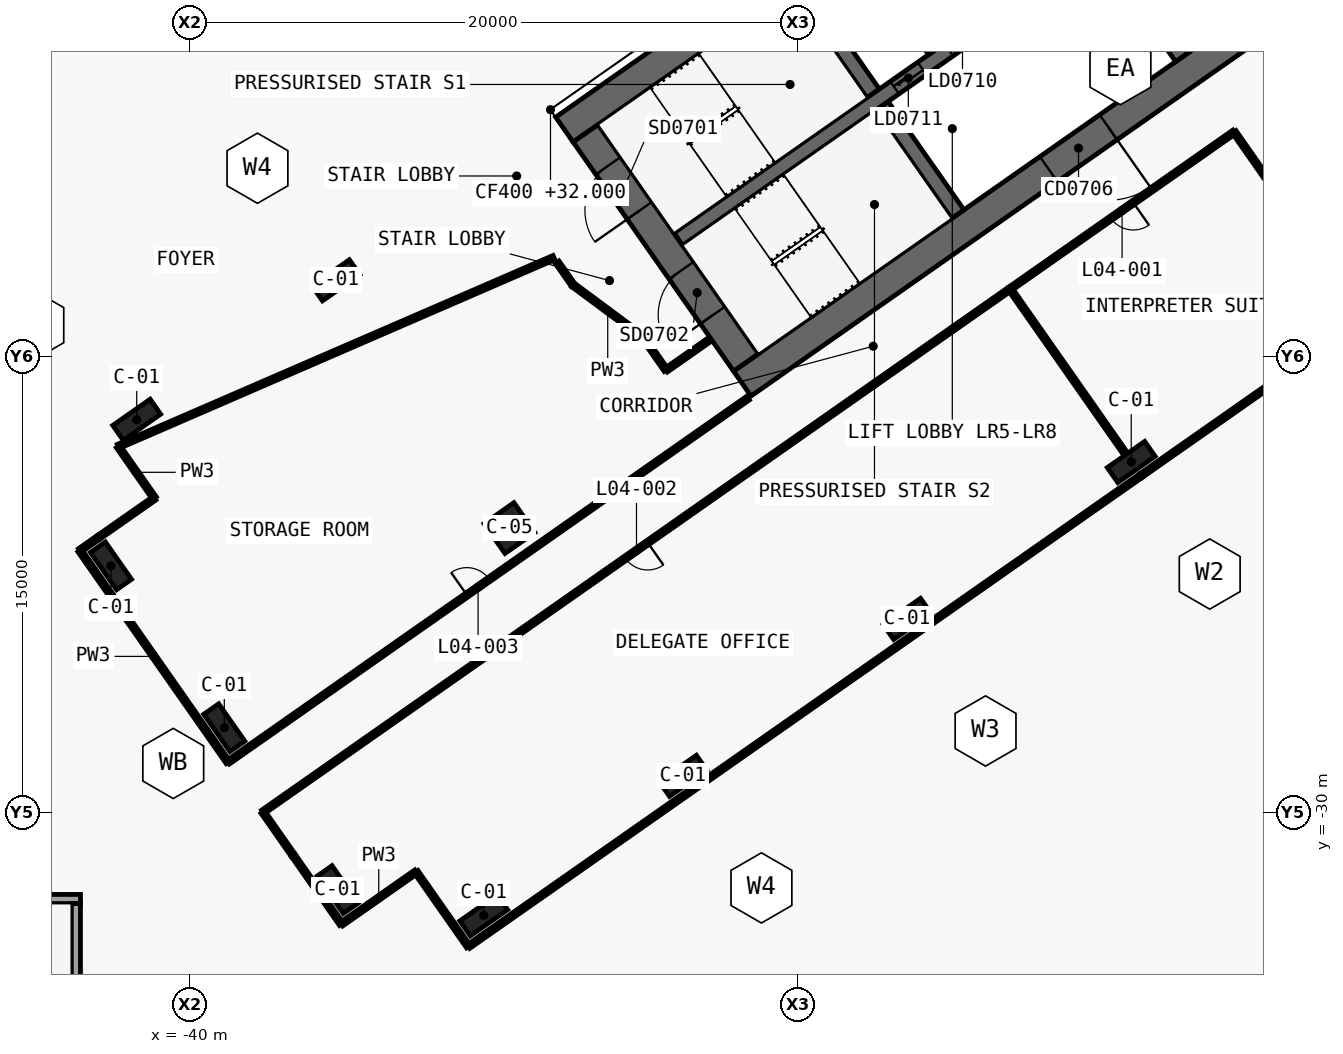
"""IFC4 building model, lengths in metres.
Left out: names, types, materials, properties, quantities, classifications, styles, units other than length and angle.
Written with IfcOpenShell. Run it as: python <this file> out.ifc"""

import sys

from ifc_helpers import new_model, si_unit, direction, frame, frame_2d, origin, origin_2d, place, context, subcontext, project, spatial, polyline, rectangle, outline, extrude, element, fill, save


model = new_model("IFC4")
c1 = context("Model", 3, precision=1e-05, world=origin(), true_north=direction((0.0, 1.0)))
c2 = subcontext(c1, "Body", "Model", "MODEL_VIEW")
j1 = project(units=[si_unit("LENGTHUNIT", "METRE"), si_unit("PLANEANGLEUNIT", "RADIAN")], contexts=[c1])
p1 = place(None, origin())
s1 = spatial("IfcSite", under=j1, at=p1, CompositionType="ELEMENT")
p2 = place(p1, origin())
s2 = spatial("IfcBuilding", under=s1, at=p2, CompositionType="ELEMENT")
p3 = place(p2, frame((0.0, 0.0, 32.0)))
s3 = spatial("IfcBuildingStorey", under=s2, at=p3, CompositionType="ELEMENT", Elevation=32.0)
p4 = place(p3, frame((0.037, 11.867, 0.0), z_axis=(0.0, 0.0, 1.0), x_axis=(-0.819155306259, -0.573571777746, 0.0)))
e1 = element("IfcWall", 1, at=p4, inside=s3, PredefinedType="SHEAR", context=c2, shape_type="SweptSolid", body=[
    extrude(outline(polyline([(33.837, 0.5), (0.7, 0.5), (0.0, -0.5), (33.837, -0.5), (33.837, 0.5)])), origin(), (0.0, 0.0, 1.0), 5.5),
])
p5 = place(p3, frame((0.037, -0.585, 0.0), z_axis=(0.0, 0.0, 1.0), x_axis=(-0.819157152511, -0.573569140985, 0.0)))
e2 = element("IfcWall", 2, at=p5, inside=s3, PredefinedType="SHEAR", context=c2, shape_type="SweptSolid", body=[
    extrude(outline(polyline([(26.695, 0.5), (0.7, 0.5), (0.0, -0.5), (26.695, -0.5), (26.695, 0.5)])), origin(), (0.0, 0.0, 1.0), 5.5),
])
p6 = place(p5, frame((2.995, 0.0, 0.0)))
e3 = element("IfcOpeningElement", 3, at=p6, cuts=e2, PredefinedType="OPENING", context=c2, shape_type="SweptSolid", body=[
    extrude(rectangle(XDim=2.4, YDim=2.1, at=frame_2d((1.2, 1.05))), frame((0.0, 0.51, 0.0), z_axis=(0.0, -1.0, 0.0), x_axis=(1.0, 0.0, 0.0)), (0.0, 0.0, 1.0), 1.02),
])
p7 = place(p5, frame((11.995, 0.0, 0.0)))
e4 = element("IfcOpeningElement", 4, at=p7, cuts=e2, PredefinedType="OPENING", context=c2, shape_type="SweptSolid", body=[
    extrude(rectangle(XDim=2.4, YDim=2.1, at=frame_2d((1.2, 1.05))), frame((0.0, 0.51, 0.0), z_axis=(0.0, -1.0, 0.0), x_axis=(1.0, 0.0, 0.0)), (0.0, 0.0, 1.0), 1.02),
])
p8 = place(p3, frame((-21.708, -15.2, 0.0), z_axis=(0.0, 0.0, 1.0), x_axis=(-0.573576324356, 0.819152122709, 0.0)))
e5 = element("IfcWall", 5, at=p8, inside=s3, PredefinedType="SHEAR", context=c2, shape_type="SweptSolid", body=[
    extrude(outline(polyline([(0.0, 0.5), (0.0, -0.5), (9.2, -0.5), (9.2, 0.5), (0.0, 0.5)])), origin(), (0.0, 0.0, 1.0), 5.5),
])
p9 = place(p8, frame((6.1, 0.0, 0.0)))
e6 = element("IfcOpeningElement", 6, at=p9, cuts=e5, PredefinedType="OPENING", context=c2, shape_type="SweptSolid", body=[
    extrude(rectangle(XDim=1.8, YDim=2.1, at=frame_2d((0.9, 1.05))), frame((0.0, 0.51, 0.0), z_axis=(0.0, -1.0, 0.0), x_axis=(1.0, 0.0, 0.0)), (0.0, 0.0, 1.0), 1.02),
])
p10 = place(p8, frame((1.9, 0.0, 0.0)))
e7 = element("IfcOpeningElement", 7, at=p10, cuts=e5, PredefinedType="OPENING", context=c2, shape_type="SweptSolid", body=[
    extrude(rectangle(XDim=1.8, YDim=2.1, at=frame_2d((0.9, 1.05))), frame((0.0, 0.51, 0.0), z_axis=(0.0, -1.0, 0.0), x_axis=(1.0, 0.0, 0.0)), (0.0, 0.0, 1.0), 1.02),
])
p11 = place(p3, frame((-7.372, -5.162, 0.0), z_axis=(0.0, 0.0, 1.0), x_axis=(-0.573594173421, 0.819139624372, 0.0)))
e8 = element("IfcWall", 8, at=p11, inside=s3, PredefinedType="SHEAR", context=c2, shape_type="SweptSolid", body=[
    extrude(outline(polyline([(4.35, 0.25), (0.0, 0.25), (0.0, -0.25), (4.35, -0.25), (4.35, 0.25)])), origin(), (0.0, 0.0, 1.0), 5.5),
])
p12 = place(p3, frame((-14.745, -10.324, 0.0), z_axis=(0.0, 0.0, 1.0), x_axis=(-0.57356780395, 0.819158088694, 0.0)))
e9 = element("IfcWall", 9, at=p12, inside=s3, PredefinedType="SHEAR", context=c2, shape_type="SweptSolid", body=[
    extrude(outline(polyline([(4.35, 0.25), (0.0, 0.25), (0.0, -0.25), (4.35, -0.25), (4.35, 0.25)])), origin(), (0.0, 0.0, 1.0), 5.5),
])
p13 = place(p3, frame((-17.527, -6.352, 0.0), z_axis=(0.0, 0.0, 1.0), x_axis=(-0.573530143085, 0.819184457233, 0.0)))
e10 = element("IfcWall", 10, at=p13, inside=s3, PredefinedType="SHEAR", context=c2, shape_type="SweptSolid", body=[
    extrude(outline(polyline([(4.35, -0.25), (4.35, 0.25), (0.0, 0.25), (0.0, -0.25), (4.35, -0.25)])), origin(), (0.0, 0.0, 1.0), 5.5),
])
p14 = place(p3, frame((-2.638, 3.768, 0.0), z_axis=(0.0, 0.0, 1.0), x_axis=(-0.819148977158, -0.573580816643, 0.0)))
e11 = element("IfcWall", 11, at=p14, inside=s3, PredefinedType="SHEAR", context=c2, shape_type="SweptSolid", body=[
    extrude(outline(polyline([(26.0, 0.25), (0.0, 0.25), (0.0, -0.25), (26.0, -0.25), (26.0, 0.25)])), origin(), (0.0, 0.0, 1.0), 5.5),
])
p15 = place(p14, frame((1.169, 0.0, 0.0)))
e12 = element("IfcOpeningElement", 12, at=p15, cuts=e11, PredefinedType="OPENING", context=c2, shape_type="SweptSolid", body=[
    extrude(rectangle(XDim=1.1, YDim=2.1, at=frame_2d((0.55, 1.05))), frame((0.0, 0.26, 0.0), z_axis=(0.0, -1.0, 0.0), x_axis=(1.0, 0.0, 0.0)), (0.0, 0.0, 1.0), 0.52),
])
p16 = place(p14, frame((3.206, 0.0, 0.0)))
e13 = element("IfcOpeningElement", 13, at=p16, cuts=e11, PredefinedType="OPENING", context=c2, shape_type="SweptSolid", body=[
    extrude(rectangle(XDim=1.1, YDim=2.1, at=frame_2d((0.55, 1.05))), frame((0.0, 0.26, 0.0), z_axis=(0.0, -1.0, 0.0), x_axis=(1.0, 0.0, 0.0)), (0.0, 0.0, 1.0), 0.52),
])
p17 = place(p14, frame((5.244, 0.0, 0.0)))
e14 = element("IfcOpeningElement", 14, at=p17, cuts=e11, PredefinedType="OPENING", context=c2, shape_type="SweptSolid", body=[
    extrude(rectangle(XDim=1.1, YDim=2.1, at=frame_2d((0.55, 1.05))), frame((0.0, 0.26, 0.0), z_axis=(0.0, -1.0, 0.0), x_axis=(1.0, 0.0, 0.0)), (0.0, 0.0, 1.0), 0.52),
])
p18 = place(p14, frame((7.281, 0.0, 0.0)))
e15 = element("IfcOpeningElement", 15, at=p18, cuts=e11, PredefinedType="OPENING", context=c2, shape_type="SweptSolid", body=[
    extrude(rectangle(XDim=1.1, YDim=2.1, at=frame_2d((0.55, 1.05))), frame((0.0, 0.26, 0.0), z_axis=(0.0, -1.0, 0.0), x_axis=(1.0, 0.0, 0.0)), (0.0, 0.0, 1.0), 0.52),
])
p19 = place(p14, frame((9.688, 0.0, 0.0)))
e16 = element("IfcOpeningElement", 16, at=p19, cuts=e11, PredefinedType="OPENING", context=c2, shape_type="SweptSolid", body=[
    extrude(rectangle(XDim=1.1, YDim=2.1, at=frame_2d((0.55, 1.05))), frame((0.0, 0.26, 0.0), z_axis=(0.0, -1.0, 0.0), x_axis=(1.0, 0.0, 0.0)), (0.0, 0.0, 1.0), 0.52),
])
p20 = place(p14, frame((11.863, 0.0, 0.0)))
e17 = element("IfcOpeningElement", 17, at=p20, cuts=e11, PredefinedType="OPENING", context=c2, shape_type="SweptSolid", body=[
    extrude(rectangle(XDim=1.1, YDim=2.1, at=frame_2d((0.55, 1.05))), frame((0.0, 0.26, 0.0), z_axis=(0.0, -1.0, 0.0), x_axis=(1.0, 0.0, 0.0)), (0.0, 0.0, 1.0), 0.52),
])
p21 = place(p14, frame((14.038, 0.0, 0.0)))
e18 = element("IfcOpeningElement", 18, at=p21, cuts=e11, PredefinedType="OPENING", context=c2, shape_type="SweptSolid", body=[
    extrude(rectangle(XDim=1.1, YDim=2.1, at=frame_2d((0.55, 1.05))), frame((0.0, 0.26, 0.0), z_axis=(0.0, -1.0, 0.0), x_axis=(1.0, 0.0, 0.0)), (0.0, 0.0, 1.0), 0.52),
])
p22 = place(p14, frame((16.212, 0.0, 0.0)))
e19 = element("IfcOpeningElement", 19, at=p22, cuts=e11, PredefinedType="OPENING", context=c2, shape_type="SweptSolid", body=[
    extrude(rectangle(XDim=1.1, YDim=2.1, at=frame_2d((0.55, 1.05))), frame((0.0, 0.26, 0.0), z_axis=(0.0, -1.0, 0.0), x_axis=(1.0, 0.0, 0.0)), (0.0, 0.0, 1.0), 0.52),
])
p23 = place(p3, frame((-49.4, -32.85, 0.0), z_axis=(0.0, 0.0, 1.0), x_axis=(1.0, 0.0, 0.0)))
e20 = element("IfcWall", 20, at=p23, inside=s3, PredefinedType="SOLIDWALL", context=c2, shape_type="SweptSolid", body=[
    extrude(rectangle(XDim=5.8, YDim=0.3, at=frame_2d((2.9, 0.0))), origin(), (0.0, 0.0, 1.0), 5.5),
])
p24 = place(p3, frame((-43.75, -43.0, 0.0), z_axis=(0.0, 0.0, 1.0), x_axis=(0.0, 1.0, 0.0)))
e21 = element("IfcWall", 21, at=p24, inside=s3, PredefinedType="SOLIDWALL", context=c2, shape_type="SweptSolid", body=[
    extrude(rectangle(XDim=10.0, YDim=0.3, at=frame_2d((5.0, 0.0))), origin(), (0.0, 0.0, 1.0), 5.5),
])
p25 = place(p24, frame((0.212, 0.0, 0.0)))
e22 = element("IfcOpeningElement", 22, at=p25, cuts=e21, PredefinedType="OPENING", context=c2, shape_type="SweptSolid", body=[
    extrude(rectangle(XDim=2.1, YDim=2.1, at=frame_2d((1.05, 1.05))), frame((0.0, 0.16, 0.0), z_axis=(0.0, -1.0, 0.0), x_axis=(1.0, 0.0, 0.0)), (0.0, 0.0, 1.0), 0.32),
])
for number, where, z_axis, x_axis in (
    (23, (-9.038, -18.475, 0.0), (0.0, 0.0, 1.0), (-0.819, -0.574, 0.0)),
    (24, (-16.41, -23.637, 0.0), (0.0, 0.0, 1.0), (-0.819, -0.574, 0.0)),
    (25, (-23.782, -28.799, 0.0), (0.0, 0.0, 1.0), (-0.819, -0.574, 0.0)),
    (26, (-30.336, -33.388, 0.0), (0.0, 0.0, 1.0), (-0.819, -0.574, 0.0)),
    (27, (-35.197, -12.498, 0.0), (0.0, 0.0, 1.0), (-0.819, -0.574, 0.0)),
    (28, (-41.75, -17.087, 0.0), (0.0, 0.0, 1.0), (-0.819, -0.574, 0.0)),
    (29, (-35.14, -32.541, 0.0), (0.0, 0.0, 1.0), (-0.574, 0.819, 0.0)),
    (30, (-38.869, -27.216, 0.0), (0.0, 0.0, 1.0), (-0.574, 0.819, 0.0)),
    (31, (-42.597, -21.892, 0.0), (0.0, 0.0, 1.0), (-0.574, 0.819, 0.0)),
):
    element("IfcColumn", number, at=place(p3, frame(where, z_axis=z_axis, x_axis=x_axis)), inside=s3, PredefinedType="COLUMN", context=c2, shape_type="SweptSolid", body=[
        extrude(rectangle(XDim=1.5, YDim=0.6, at=origin_2d()), origin(), (0.0, 0.0, 1.0), 5.5),
    ])
p26 = place(p3, frame((-29.49, -20.649, 0.0), z_axis=(0.0, 0.0, 1.0), x_axis=(-0.819152044289, -0.573576436351, 0.0)))
e32 = element("IfcColumn", 32, at=p26, inside=s3, PredefinedType="COLUMN", context=c2, shape_type="SweptSolid", body=[
    extrude(rectangle(XDim=1.2, YDim=1.2, at=origin_2d()), origin(), (0.0, 0.0, 1.0), 5.5),
])
p27 = place(p3, frame((-15.622, -5.018, 0.0), z_axis=(0.0, 0.0, 1.0), x_axis=(-0.573594173421, 0.819139624372, 0.0)))
e33 = element("IfcWall", 33, at=p27, inside=s3, PredefinedType="SOLIDWALL", context=c2, shape_type="SweptSolid", body=[
    extrude(rectangle(XDim=4.35, YDim=0.2, at=frame_2d((2.175, 0.0))), origin(), (0.0, 0.0, 1.0), 5.5),
])
p28 = place(p3, frame((-38.746, -28.351, 0.0), z_axis=(0.0, 0.0, 1.0), x_axis=(0.819148965066, 0.573580833911, 0.0)))
e34 = element("IfcWall", 34, at=p28, inside=s3, PredefinedType="PARTITIONING", context=c2, shape_type="SweptSolid", body=[
    extrude(rectangle(XDim=20.88, YDim=0.15, at=frame_2d((10.44, 0.0))), origin(), (0.0, 0.0, 1.0), 3.68),
])
p29 = place(p28, frame((9.59, 0.0, 0.0)))
e35 = element("IfcOpeningElement", 35, at=p29, cuts=e34, PredefinedType="OPENING", context=c2, shape_type="SweptSolid", body=[
    extrude(rectangle(XDim=0.9, YDim=2.1, at=frame_2d((0.45, 1.05))), frame((0.0, 0.085, 0.0), z_axis=(0.0, -1.0, 0.0), x_axis=(1.0, 0.0, 0.0)), (0.0, 0.0, 1.0), 0.17),
])
p30 = place(p3, frame((-5.652, -7.62, 0.0), z_axis=(0.0, 0.0, 1.0), x_axis=(-0.81915291695, -0.57357519006, 0.0)))
e36 = element("IfcWall", 36, at=p30, inside=s3, PredefinedType="PARTITIONING", context=c2, shape_type="SweptSolid", body=[
    extrude(rectangle(XDim=9.002, YDim=0.15, at=frame_2d((4.501, 0.0))), origin(), (0.0, 0.0, 1.0), 3.68),
])
p31 = place(p30, frame((4.051, 0.0, 0.0)))
e37 = element("IfcOpeningElement", 37, at=p31, cuts=e36, PredefinedType="OPENING", context=c2, shape_type="SweptSolid", body=[
    extrude(rectangle(XDim=0.9, YDim=2.1, at=frame_2d((0.45, 1.05))), frame((0.0, 0.085, 0.0), z_axis=(0.0, -1.0, 0.0), x_axis=(1.0, 0.0, 0.0)), (0.0, 0.0, 1.0), 0.17),
])
p32 = place(p3, frame((-13.022, -12.781, 0.0), z_axis=(0.0, 0.0, 1.0), x_axis=(-0.819154688631, -0.57357265982, 0.0)))
e38 = element("IfcWall", 38, at=p32, inside=s3, PredefinedType="PARTITIONING", context=c2, shape_type="SweptSolid", body=[
    extrude(rectangle(XDim=30.002, YDim=0.15, at=frame_2d((15.001, 0.0))), origin(), (0.0, 0.0, 1.0), 3.68),
])
p33 = place(p32, frame((14.551, 0.0, 0.0)))
e39 = element("IfcOpeningElement", 39, at=p33, cuts=e38, PredefinedType="OPENING", context=c2, shape_type="SweptSolid", body=[
    extrude(rectangle(XDim=0.9, YDim=2.1, at=frame_2d((0.45, 1.05))), frame((0.0, 0.085, 0.0), z_axis=(0.0, -1.0, 0.0), x_axis=(1.0, 0.0, 0.0)), (0.0, 0.0, 1.0), 0.17),
])
p34 = place(p3, frame((-8.723, -18.927, 0.0), z_axis=(0.0, 0.0, 1.0), x_axis=(0.81913387212, 0.573602388024, 0.0)))
e40 = element("IfcWall", 40, at=p34, inside=s3, PredefinedType="PARTITIONING", context=c2, shape_type="SweptSolid", body=[
    extrude(rectangle(XDim=6.552, YDim=0.15, at=frame_2d((3.276, 0.0))), origin(), (0.0, 0.0, 1.0), 5.1),
])
p35 = place(p3, frame((-35.017, -33.676, 0.0), z_axis=(0.0, 0.0, 1.0), x_axis=(0.81917072002, 0.573549763719, 0.0)))
e41 = element("IfcWall", 41, at=p35, inside=s3, PredefinedType="PARTITIONING", context=c2, shape_type="SweptSolid", body=[
    extrude(rectangle(XDim=2.999, YDim=0.15, at=frame_2d((1.5, 0.0))), origin(), (0.0, 0.0, 1.0), 3.88),
])
p36 = place(p3, frame((-32.56, -31.956, 0.0), z_axis=(0.0, 0.0, 1.0), x_axis=(0.573604390867, -0.819132469615, 0.0)))
e42 = element("IfcWall", 42, at=p36, inside=s3, PredefinedType="PARTITIONING", context=c2, shape_type="SweptSolid", body=[
    extrude(rectangle(XDim=2.999, YDim=0.15, at=frame_2d((1.5, 0.0))), origin(), (0.0, 0.0, 1.0), 3.88),
])
p37 = place(p3, frame((-30.839, -34.413, 0.0), z_axis=(0.0, 0.0, 1.0), x_axis=(0.819150779762, 0.573578242279, 0.0)))
e43 = element("IfcWall", 43, at=p37, inside=s3, PredefinedType="PARTITIONING", context=c2, shape_type="SweptSolid", body=[
    extrude(rectangle(XDim=27.002, YDim=0.15, at=frame_2d((13.501, 0.0))), origin(), (0.0, 0.0, 1.0), 4.08),
])
p38 = place(p3, frame((-36.599, -31.418, 0.0), z_axis=(0.0, 0.0, 1.0), x_axis=(0.57362881286, -0.819115367367, 0.0)))
e44 = element("IfcWall", 44, at=p38, inside=s3, PredefinedType="PARTITIONING", context=c2, shape_type="SweptSolid", body=[
    extrude(rectangle(XDim=2.756, YDim=0.15, at=frame_2d((1.378, 0.0))), origin(), (0.0, 0.0, 1.0), 5.1),
])
p39 = place(p3, frame((-42.359, -17.961, 0.0), z_axis=(0.0, 0.0, 1.0), x_axis=(0.573603984281, -0.819132754331, 0.0)))
e45 = element("IfcWall", 45, at=p39, inside=s3, PredefinedType="PARTITIONING", context=c2, shape_type="SweptSolid", body=[
    extrude(rectangle(XDim=2.082, YDim=0.15, at=frame_2d((1.041, 0.0))), origin(), (0.0, 0.0, 1.0), 3.88),
])
p40 = place(p3, frame((-41.165, -19.667, 0.0), z_axis=(0.0, 0.0, 1.0), x_axis=(-0.819149945048, -0.573579434366, 0.0)))
e46 = element("IfcWall", 46, at=p40, inside=s3, PredefinedType="PARTITIONING", context=c2, shape_type="SweptSolid", body=[
    extrude(rectangle(XDim=2.239, YDim=0.15, at=frame_2d((1.119, 0.0))), origin(), (0.0, 0.0, 1.0), 3.88),
])
p41 = place(p3, frame((-43.622, -21.387, 0.0), z_axis=(0.0, 0.0, 1.0), x_axis=(0.573487395822, -0.819214383928, 0.0)))
e47 = element("IfcWall", 47, at=p41, inside=s3, PredefinedType="PARTITIONING", context=c2, shape_type="SweptSolid", body=[
    extrude(rectangle(XDim=8.503, YDim=0.15, at=frame_2d((4.251, 0.0))), origin(), (0.0, 0.0, 1.0), 5.1),
])
p42 = place(p3, frame((-43.0, -20.952, 0.0), z_axis=(0.0, 0.0, 1.0), x_axis=(-0.819216809636, -0.573483930734, 0.0)))
e48 = element("IfcWall", 48, at=p42, inside=s3, PredefinedType="PARTITIONING", context=c2, shape_type="SweptSolid", body=[
    extrude(rectangle(XDim=0.759, YDim=0.15, at=frame_2d((0.379, 0.0))), origin(), (0.0, 0.0, 1.0), 5.1),
])
p43 = place(p3, frame((-37.6, -29.988, 0.0), z_axis=(0.0, 0.0, 1.0), x_axis=(0.573518712821, -0.819192459709, 0.0)))
e49 = element("IfcWall", 49, at=p43, inside=s3, PredefinedType="PARTITIONING", context=c2, shape_type="SweptSolid", body=[
    extrude(rectangle(XDim=1.744, YDim=0.15, at=frame_2d((0.872, 0.0))), origin(), (0.0, 0.0, 1.0), 5.1),
])
p44 = place(p3, frame((-1.849, -13.051, 0.0), z_axis=(0.0, 0.0, 1.0), x_axis=(-0.573575988258, 0.819152358047, 0.0)))
e50 = element("IfcWall", 50, at=p44, inside=s3, PredefinedType="PARTITIONING", context=c2, shape_type="SweptSolid", body=[
    extrude(rectangle(XDim=6.632, YDim=0.15, at=frame_2d((3.316, 0.0))), origin(), (0.0, 0.0, 1.0), 3.68),
])
p45 = place(p3, frame((-28.026, -11.751, 0.0), z_axis=(0.0, 0.0, 1.0), x_axis=(-0.91753357696, -0.397658314577, 0.0)))
e51 = element("IfcWall", 51, at=p45, inside=s3, PredefinedType="PARTITIONING", context=c2, shape_type="SweptSolid", body=[
    extrude(rectangle(XDim=15.621, YDim=0.15, at=frame_2d((7.811, 0.0))), origin(), (0.0, 0.0, 1.0), 3.68),
])
p46 = place(p3, frame((-22.961, -14.49, 0.0), z_axis=(0.0, 0.0, 1.0), x_axis=(-0.819109000826, -0.573637903879, 0.0)))
e52 = element("IfcWall", 52, at=p46, inside=s3, PredefinedType="PARTITIONING", context=c2, shape_type="SweptSolid", body=[
    extrude(rectangle(XDim=1.68, YDim=0.15, at=frame_2d((0.84, 0.0))), origin(), (0.0, 0.0, 1.0), 5.1),
])
p47 = place(p3, frame((-24.337, -15.454, 0.0), z_axis=(0.0, 0.0, 1.0), x_axis=(-0.573571252353, 0.819155674139, 0.0)))
e53 = element("IfcWall", 53, at=p47, inside=s3, PredefinedType="PARTITIONING", context=c2, shape_type="SweptSolid", body=[
    extrude(rectangle(XDim=1.354, YDim=0.15, at=frame_2d((0.677, 0.0))), origin(), (0.0, 0.0, 1.0), 5.1),
])
p48 = place(p3, frame((-25.114, -14.345, 0.0), z_axis=(0.0, 0.0, 1.0), x_axis=(-0.803169525988, 0.59575054555, 0.0)))
e54 = element("IfcWall", 54, at=p48, inside=s3, PredefinedType="PARTITIONING", context=c2, shape_type="SweptSolid", body=[
    extrude(rectangle(XDim=2.846, YDim=0.15, at=frame_2d((1.423, 0.0))), origin(), (0.0, 0.0, 1.0), 5.1),
])
p49 = place(p3, frame((-27.4, -12.649, 0.0), z_axis=(0.0, 0.0, 1.0), x_axis=(-0.573713979357, 0.819055718428, 0.0)))
e55 = element("IfcWall", 55, at=p49, inside=s3, PredefinedType="PARTITIONING", context=c2, shape_type="SweptSolid", body=[
    extrude(rectangle(XDim=0.912, YDim=0.15, at=frame_2d((0.456, 0.0))), origin(), (0.0, 0.0, 1.0), 5.1),
])
p50 = place(p3, frame((-9.221, -18.213, 0.0), z_axis=(0.0, 0.0, 1.0), x_axis=(-0.573556251799, 0.819166177294, 0.0)))
e56 = element("IfcWall", 56, at=p50, inside=s3, PredefinedType="PARTITIONING", context=c2, shape_type="SweptSolid", body=[
    extrude(rectangle(XDim=6.63, YDim=0.15, at=frame_2d((3.315, 0.0))), origin(), (0.0, 0.0, 1.0), 3.68),
])
p51 = place(p22, origin())
e57 = element("IfcDoor", 57, at=p51, inside=s3, OperationType="SLIDING_TO_RIGHT", PredefinedType="DOOR", context=c2, shape_type="SweptSolid", body=[
    extrude(rectangle(XDim=1.1, YDim=2.1, at=frame_2d((0.55, 1.05))), frame((0.0, 0.025, 0.0), z_axis=(0.0, -1.0, 0.0), x_axis=(1.0, 0.0, 0.0)), (0.0, 0.0, 1.0), 0.05),
])
fill(e19, e57)
p52 = place(p7, origin())
e58 = element("IfcDoor", 58, at=p52, inside=s3, OperationType="DOUBLE_DOOR_SINGLE_SWING", PredefinedType="DOOR", context=c2, shape_type="SweptSolid", body=[
    extrude(rectangle(XDim=2.4, YDim=2.1, at=frame_2d((1.2, 1.05))), frame((0.0, 0.025, 0.0), z_axis=(0.0, -1.0, 0.0), x_axis=(1.0, 0.0, 0.0)), (0.0, 0.0, 1.0), 0.05),
])
fill(e4, e58)
p53 = place(p9, origin())
e59 = element("IfcDoor", 59, at=p53, inside=s3, OperationType="DOUBLE_DOOR_SINGLE_SWING", PredefinedType="DOOR", context=c2, shape_type="SweptSolid", body=[
    extrude(rectangle(XDim=1.8, YDim=2.1, at=frame_2d((0.9, 1.05))), frame((0.0, 0.025, 0.0), z_axis=(0.0, -1.0, 0.0), x_axis=(1.0, 0.0, 0.0)), (0.0, 0.0, 1.0), 0.05),
])
fill(e6, e59)
p54 = place(p10, origin())
e60 = element("IfcDoor", 60, at=p54, inside=s3, OperationType="DOUBLE_DOOR_SINGLE_SWING", PredefinedType="DOOR", context=c2, shape_type="SweptSolid", body=[
    extrude(rectangle(XDim=1.8, YDim=2.1, at=frame_2d((0.9, 1.05))), frame((0.0, 0.025, 0.0), z_axis=(0.0, -1.0, 0.0), x_axis=(1.0, 0.0, 0.0)), (0.0, 0.0, 1.0), 0.05),
])
fill(e7, e60)
p55 = place(p31, origin())
e61 = element("IfcDoor", 61, at=p55, inside=s3, OperationType="SINGLE_SWING_RIGHT", PredefinedType="DOOR", context=c2, shape_type="SweptSolid", body=[
    extrude(rectangle(XDim=0.9, YDim=2.1, at=frame_2d((0.45, 1.05))), frame((0.0, 0.025, 0.0), z_axis=(0.0, -1.0, 0.0), x_axis=(1.0, 0.0, 0.0)), (0.0, 0.0, 1.0), 0.05),
])
fill(e37, e61)
p56 = place(p33, origin())
e62 = element("IfcDoor", 62, at=p56, inside=s3, OperationType="SINGLE_SWING_RIGHT", PredefinedType="DOOR", context=c2, shape_type="SweptSolid", body=[
    extrude(rectangle(XDim=0.9, YDim=2.1, at=frame_2d((0.45, 1.05))), frame((0.0, 0.025, 0.0), z_axis=(0.0, -1.0, 0.0), x_axis=(1.0, 0.0, 0.0)), (0.0, 0.0, 1.0), 0.05),
])
fill(e39, e62)
p57 = place(p29, origin())
e63 = element("IfcDoor", 63, at=p57, inside=s3, OperationType="SINGLE_SWING_LEFT", PredefinedType="DOOR", context=c2, shape_type="SweptSolid", body=[
    extrude(rectangle(XDim=0.9, YDim=2.1, at=frame_2d((0.45, 1.05))), frame((0.0, 0.025, 0.0), z_axis=(0.0, -1.0, 0.0), x_axis=(1.0, 0.0, 0.0)), (0.0, 0.0, 1.0), 0.05),
])
fill(e35, e63)
save(model, sys.argv[1])
